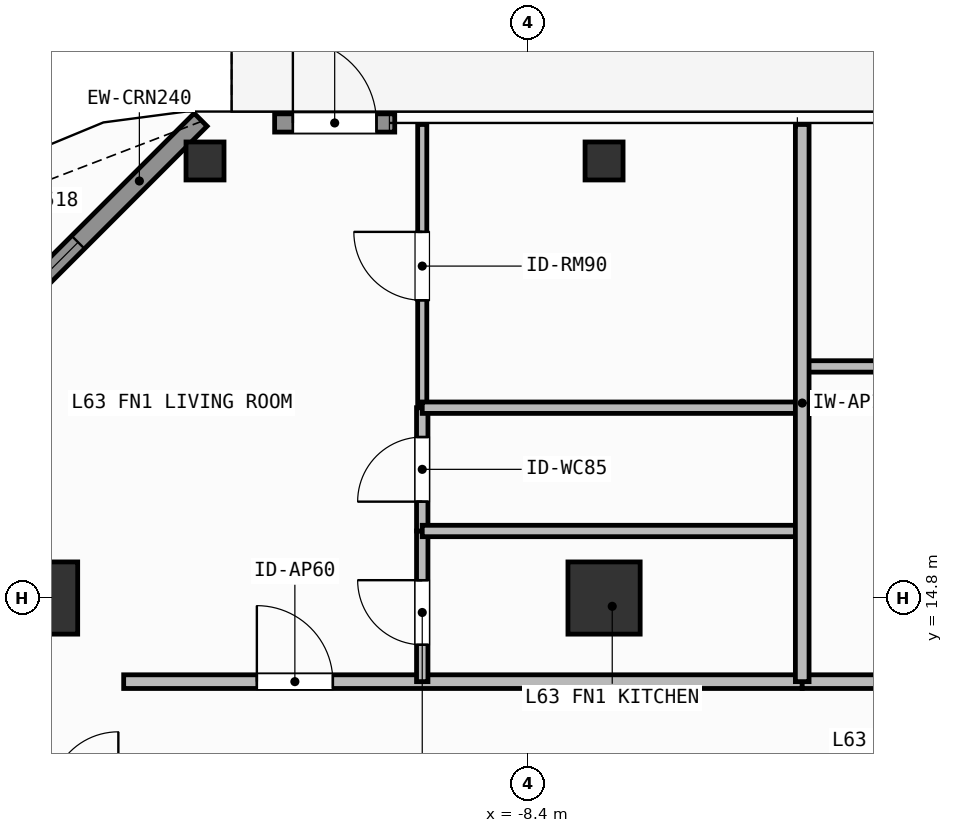
"""IFC4 building model, lengths in metres.
Left out: names, types, materials, properties, quantities, classifications, styles, units other than length and angle.
Written with IfcOpenShell. Run it as: python <this file> out.ifc"""

import sys

from ifc_helpers import new_model, si_unit, direction, frame, frame_2d, origin, origin_2d, place, context, subcontext, project, spatial, rectangle, hollow_rectangle, extrude, element, fill, save


model = new_model("IFC4")
c1 = context("Model", 3, precision=1e-05, world=origin(), true_north=direction((0.0, 1.0)))
c2 = subcontext(c1, "Body", "Model", "MODEL_VIEW")
j1 = project(units=[si_unit("LENGTHUNIT", "METRE"), si_unit("PLANEANGLEUNIT", "RADIAN")], contexts=[c1])
p1 = place(None, origin())
s1 = spatial("IfcSite", under=j1, at=p1, CompositionType="ELEMENT")
p2 = place(p1, origin())
s2 = spatial("IfcBuilding", under=s1, at=p2, CompositionType="ELEMENT")
p3 = place(p2, frame((0.0, 0.0, 258.6)))
s3 = spatial("IfcBuildingStorey", under=s2, at=p3, CompositionType="ELEMENT", Elevation=258.6)
for number, where, z_axis, x_axis in (
    (1, (-14.8, 14.8, 0.0), (0.0, 0.0, 1.0), (1.0, 0.0, 0.0)),
    (2, (-7.4, 14.8, 0.0), (0.0, 0.0, 1.0), (1.0, 0.0, 0.0)),
):
    element("IfcColumn", number, at=place(p3, frame(where, z_axis=z_axis, x_axis=x_axis)), inside=s3, PredefinedType="COLUMN", context=c2, shape_type="SweptSolid", body=[
        extrude(rectangle(XDim=0.95, YDim=0.95, at=origin_2d()), origin(), (0.0, 0.0, 1.0), 3.9),
    ])
for number, where, z_axis, x_axis in (
    (3, (-12.65, 20.55, 0.0), (0.0, 0.0, 1.0), (1.0, 0.0, 0.0)),
    (4, (-7.4, 20.55, 0.0), (0.0, 0.0, 1.0), (1.0, 0.0, 0.0)),
):
    element("IfcColumn", number, at=place(p3, frame(where, z_axis=z_axis, x_axis=x_axis)), inside=s3, PredefinedType="COLUMN", context=c2, shape_type="SweptSolid", body=[
        extrude(hollow_rectangle(XDim=0.5, YDim=0.5, WallThickness=0.025, at=origin_2d()), origin(), (0.0, 0.0, 1.0), 3.9),
    ])
p4 = place(p3, frame((-11.734, 21.05, 0.0), z_axis=(0.0, 0.0, 1.0), x_axis=(1.0, 0.0, 0.0)))
e5 = element("IfcWall", 5, at=p4, inside=s3, PredefinedType="SOLIDWALL", context=c2, shape_type="SweptSolid", body=[
    extrude(rectangle(XDim=1.58, YDim=0.24, at=frame_2d((0.79, 0.0))), origin(), (0.0, 0.0, 1.0), 3.68),
])
p5 = place(p4, frame((0.24, 0.0, 0.0)))
e6 = element("IfcOpeningElement", 6, at=p5, cuts=e5, PredefinedType="OPENING", context=c2, shape_type="SweptSolid", body=[
    extrude(rectangle(XDim=1.1, YDim=2.2, at=frame_2d((0.55, 1.1))), frame((0.0, 0.13, 0.0), z_axis=(0.0, -1.0, 0.0), x_axis=(1.0, 0.0, 0.0)), (0.0, 0.0, 1.0), 0.26),
])
p6 = place(p3, frame((-16.992, 16.808, 0.0), z_axis=(0.0, 0.0, 1.0), x_axis=(0.707126925818, 0.707086635981, 0.0)))
e7 = element("IfcWall", 7, at=p6, inside=s3, PredefinedType="SOLIDWALL", context=c2, shape_type="SweptSolid", body=[
    extrude(rectangle(XDim=6.06, YDim=0.24, at=frame_2d((3.03, 0.0))), origin(), (0.0, 0.0, 1.0), 3.68),
])
p7 = place(p6, frame((2.28, 0.0, 0.8)))
e8 = element("IfcOpeningElement", 8, at=p7, cuts=e7, PredefinedType="OPENING", context=c2, shape_type="SweptSolid", body=[
    extrude(rectangle(XDim=1.5, YDim=1.85, at=frame_2d((0.75, 0.925))), frame((0.0, 0.13, 0.0), z_axis=(0.0, -1.0, 0.0), x_axis=(1.0, 0.0, 0.0)), (0.0, 0.0, 1.0), 0.26),
])
p8 = place(p3, frame((-13.72, 13.7, 0.0), z_axis=(0.0, 0.0, 1.0), x_axis=(1.0, 0.0, 0.0)))
e9 = element("IfcWall", 9, at=p8, inside=s3, PredefinedType="PARTITIONING", context=c2, shape_type="SweptSolid", body=[
    extrude(rectangle(XDim=8.927, YDim=0.18, at=frame_2d((4.463, 0.0))), origin(), (0.0, 0.0, 1.0), 3.68),
])
p9 = place(p8, frame((1.752, 0.0, 0.0)))
e10 = element("IfcOpeningElement", 10, at=p9, cuts=e9, PredefinedType="OPENING", context=c2, shape_type="SweptSolid", body=[
    extrude(rectangle(XDim=1.0, YDim=2.2, at=frame_2d((0.5, 1.1))), frame((0.0, 0.1, 0.0), z_axis=(0.0, -1.0, 0.0), x_axis=(1.0, 0.0, 0.0)), (0.0, 0.0, 1.0), 0.2),
])
p10 = place(p3, frame((-9.792, 13.7, 0.0), z_axis=(0.0, 0.0, 1.0), x_axis=(0.0, 1.0, 0.0)))
e11 = element("IfcWall", 11, at=p10, inside=s3, PredefinedType="PARTITIONING", context=c2, shape_type="SweptSolid", body=[
    extrude(rectangle(XDim=1.982, YDim=0.15, at=frame_2d((0.991, 0.0))), origin(), (0.0, 0.0, 1.0), 3.68),
])
p11 = place(p10, frame((0.485, 0.0, 0.0)))
e12 = element("IfcOpeningElement", 12, at=p11, cuts=e11, PredefinedType="OPENING", context=c2, shape_type="SweptSolid", body=[
    extrude(rectangle(XDim=0.85, YDim=2.1, at=frame_2d((0.425, 1.05))), frame((0.0, 0.085, 0.0), z_axis=(0.0, -1.0, 0.0), x_axis=(1.0, 0.0, 0.0)), (0.0, 0.0, 1.0), 0.17),
])
p12 = place(p3, frame((-9.792, 15.682, 0.0), z_axis=(0.0, 0.0, 1.0), x_axis=(0.0, 1.0, 0.0)))
e13 = element("IfcWall", 13, at=p12, inside=s3, PredefinedType="PARTITIONING", context=c2, shape_type="SweptSolid", body=[
    extrude(rectangle(XDim=1.622, YDim=0.15, at=frame_2d((0.811, 0.0))), origin(), (0.0, 0.0, 1.0), 3.68),
])
p13 = place(p12, frame((0.386, 0.0, 0.0)))
e14 = element("IfcOpeningElement", 14, at=p13, cuts=e13, PredefinedType="OPENING", context=c2, shape_type="SweptSolid", body=[
    extrude(rectangle(XDim=0.85, YDim=2.1, at=frame_2d((0.425, 1.05))), frame((0.0, 0.085, 0.0), z_axis=(0.0, -1.0, 0.0), x_axis=(1.0, 0.0, 0.0)), (0.0, 0.0, 1.0), 0.17),
])
p14 = place(p3, frame((-9.792, 17.304, 0.0), z_axis=(0.0, 0.0, 1.0), x_axis=(0.0, 1.0, 0.0)))
e15 = element("IfcWall", 15, at=p14, inside=s3, PredefinedType="PARTITIONING", context=c2, shape_type="SweptSolid", body=[
    extrude(rectangle(XDim=3.726, YDim=0.12, at=frame_2d((1.863, 0.0))), origin(), (0.0, 0.0, 1.0), 3.68),
])
p15 = place(p14, frame((1.413, 0.0, 0.0)))
e16 = element("IfcOpeningElement", 16, at=p15, cuts=e15, PredefinedType="OPENING", context=c2, shape_type="SweptSolid", body=[
    extrude(rectangle(XDim=0.9, YDim=2.1, at=frame_2d((0.45, 1.05))), frame((0.0, 0.07, 0.0), z_axis=(0.0, -1.0, 0.0), x_axis=(1.0, 0.0, 0.0)), (0.0, 0.0, 1.0), 0.14),
])
p16 = place(p3, frame((-4.793, 13.7, 0.0), z_axis=(0.0, 0.0, 1.0), x_axis=(1.0, 0.0, 0.0)))
e17 = element("IfcWall", 17, at=p16, inside=s3, PredefinedType="PARTITIONING", context=c2, shape_type="SweptSolid", body=[
    extrude(rectangle(XDim=15.835, YDim=0.18, at=frame_2d((7.917, 0.0))), origin(), (0.0, 0.0, 1.0), 3.68),
])
p17 = place(p16, frame((7.686, 0.0, 0.0)))
e18 = element("IfcOpeningElement", 18, at=p17, cuts=e17, PredefinedType="OPENING", context=c2, shape_type="SweptSolid", body=[
    extrude(rectangle(XDim=1.0, YDim=2.2, at=frame_2d((0.5, 1.1))), frame((0.0, 0.1, 0.0), z_axis=(0.0, -1.0, 0.0), x_axis=(1.0, 0.0, 0.0)), (0.0, 0.0, 1.0), 0.2),
])
for number, where, z_axis, x_axis in (
    (19, (-9.792, 15.682, 0.0), (0.0, 0.0, 1.0), (1.0, 0.0, 0.0)),
    (20, (-9.792, 17.304, 0.0), (0.0, 0.0, 1.0), (1.0, 0.0, 0.0)),
):
    element("IfcWall", number, at=place(p3, frame(where, z_axis=z_axis, x_axis=x_axis)), inside=s3, PredefinedType="PARTITIONING", context=c2, shape_type="SweptSolid", body=[
        extrude(rectangle(XDim=4.999, YDim=0.15, at=frame_2d((2.5, 0.0))), origin(), (0.0, 0.0, 1.0), 3.68),
    ])
p18 = place(p3, frame((-4.793, 17.847, 0.0), z_axis=(0.0, 0.0, 1.0), x_axis=(1.0, 0.0, 0.0)))
e21 = element("IfcWall", 21, at=p18, inside=s3, PredefinedType="PARTITIONING", context=c2, shape_type="SweptSolid", body=[
    extrude(rectangle(XDim=6.334, YDim=0.15, at=frame_2d((3.167, 0.0))), origin(), (0.0, 0.0, 1.0), 3.68),
])
p19 = place(p3, frame((-4.793, 13.7, 0.0), z_axis=(0.0, 0.0, 1.0), x_axis=(0.0, 1.0, 0.0)))
e22 = element("IfcWall", 22, at=p19, inside=s3, PredefinedType="PARTITIONING", context=c2, shape_type="SweptSolid", body=[
    extrude(rectangle(XDim=7.33, YDim=0.18, at=frame_2d((3.665, 0.0))), origin(), (0.0, 0.0, 1.0), 3.68),
])
p20 = place(p5, origin())
e23 = element("IfcDoor", 23, at=p20, inside=s3, OperationType="SINGLE_SWING_LEFT", PredefinedType="DOOR", context=c2, shape_type="SweptSolid", body=[
    extrude(rectangle(XDim=1.1, YDim=2.2, at=frame_2d((0.55, 1.1))), frame((0.0, 0.025, 0.0), z_axis=(0.0, -1.0, 0.0), x_axis=(1.0, 0.0, 0.0)), (0.0, 0.0, 1.0), 0.05),
])
fill(e6, e23)
p21 = place(p7, origin())
e24 = element("IfcWindow", 24, at=p21, inside=s3, PartitioningType="SINGLE_PANEL", PredefinedType="WINDOW", context=c2, shape_type="SweptSolid", body=[
    extrude(rectangle(XDim=1.5, YDim=1.85, at=frame_2d((0.75, 0.925))), frame((0.0, 0.03, 0.0), z_axis=(0.0, -1.0, 0.0), x_axis=(1.0, 0.0, 0.0)), (0.0, 0.0, 1.0), 0.06),
])
fill(e8, e24)
p22 = place(p9, origin())
e25 = element("IfcDoor", 25, at=p22, inside=s3, OperationType="SINGLE_SWING_LEFT", PredefinedType="DOOR", context=c2, shape_type="SweptSolid", body=[
    extrude(rectangle(XDim=1.0, YDim=2.2, at=frame_2d((0.5, 1.1))), frame((0.0, 0.025, 0.0), z_axis=(0.0, -1.0, 0.0), x_axis=(1.0, 0.0, 0.0)), (0.0, 0.0, 1.0), 0.05),
])
fill(e10, e25)
p23 = place(p11, origin())
e26 = element("IfcDoor", 26, at=p23, inside=s3, OperationType="SINGLE_SWING_RIGHT", PredefinedType="DOOR", context=c2, shape_type="SweptSolid", body=[
    extrude(rectangle(XDim=0.85, YDim=2.1, at=frame_2d((0.425, 1.05))), frame((0.0, 0.025, 0.0), z_axis=(0.0, -1.0, 0.0), x_axis=(1.0, 0.0, 0.0)), (0.0, 0.0, 1.0), 0.05),
])
fill(e12, e26)
p24 = place(p13, origin())
e27 = element("IfcDoor", 27, at=p24, inside=s3, OperationType="SINGLE_SWING_LEFT", PredefinedType="DOOR", context=c2, shape_type="SweptSolid", body=[
    extrude(rectangle(XDim=0.85, YDim=2.1, at=frame_2d((0.425, 1.05))), frame((0.0, 0.025, 0.0), z_axis=(0.0, -1.0, 0.0), x_axis=(1.0, 0.0, 0.0)), (0.0, 0.0, 1.0), 0.05),
])
fill(e14, e27)
p25 = place(p15, origin())
e28 = element("IfcDoor", 28, at=p25, inside=s3, OperationType="SINGLE_SWING_RIGHT", PredefinedType="DOOR", context=c2, shape_type="SweptSolid", body=[
    extrude(rectangle(XDim=0.9, YDim=2.1, at=frame_2d((0.45, 1.05))), frame((0.0, 0.025, 0.0), z_axis=(0.0, -1.0, 0.0), x_axis=(1.0, 0.0, 0.0)), (0.0, 0.0, 1.0), 0.05),
])
fill(e16, e28)
save(model, sys.argv[1])
